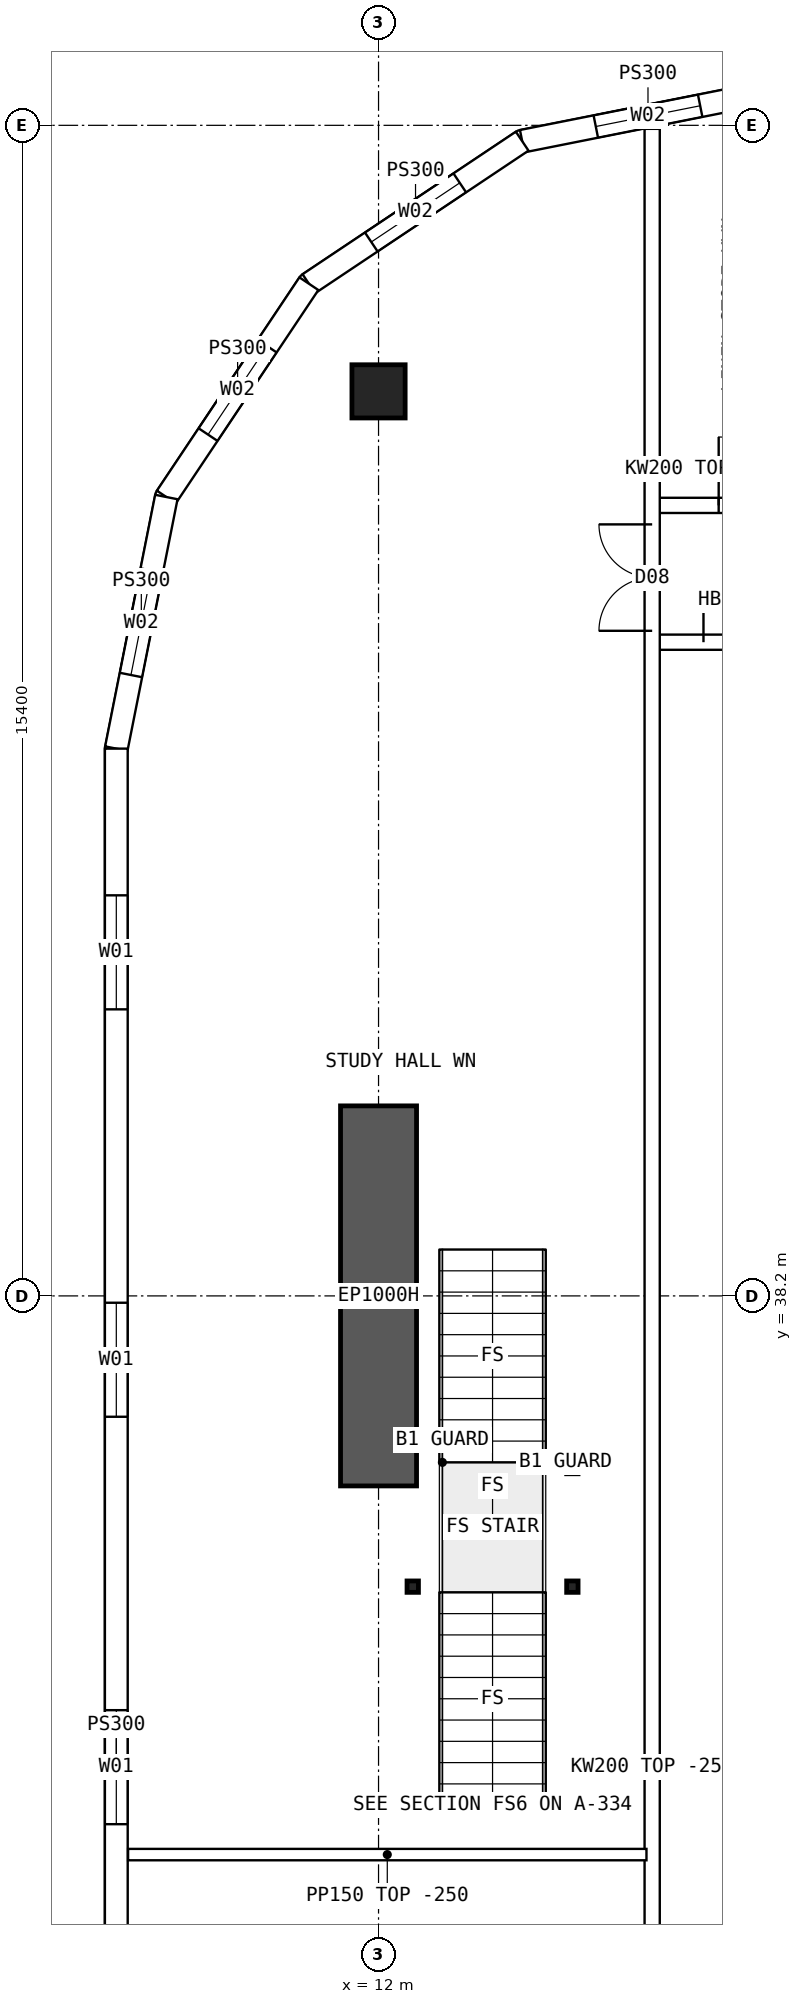
"""IFC4 building model, lengths in metres.
Left out: names, types, materials, properties, quantities, classifications, styles, units other than length and angle.
Written with IfcOpenShell. Run it as: python <this file> out.ifc"""

import sys

from ifc_helpers import new_model, si_unit, direction, frame, frame_2d, origin, origin_2d, place, context, subcontext, project, spatial, polyline, rectangle, hollow_rectangle, outline, extrude, element, fill, save


model = new_model("IFC4")
c1 = context("Model", 3, precision=1e-05, world=origin(), true_north=direction((0.0, 1.0)))
c2 = subcontext(c1, "Body", "Model", "MODEL_VIEW")
j1 = project(units=[si_unit("LENGTHUNIT", "METRE"), si_unit("PLANEANGLEUNIT", "RADIAN")], contexts=[c1])
p1 = place(None, origin())
s1 = spatial("IfcSite", under=j1, at=p1, CompositionType="ELEMENT")
p2 = place(p1, origin())
s2 = spatial("IfcBuilding", under=s1, at=p2, CompositionType="ELEMENT")
p3 = place(p2, frame((0.0, 0.0, 193.6)))
s3 = spatial("IfcBuildingStorey", under=s2, at=p3, CompositionType="ELEMENT", Elevation=193.6)
p4 = place(p3, frame((12.0, 50.1, 0.0), z_axis=(0.0, 0.0, 1.0), x_axis=(1.0, 0.0, 0.0)))
e1 = element("IfcColumn", 1, at=p4, inside=s3, PredefinedType="COLUMN", context=c2, shape_type="SweptSolid", body=[
    extrude(hollow_rectangle(XDim=0.7, YDim=0.7, WallThickness=0.07, at=origin_2d()), origin(), (0.0, 0.0, 1.0), 3.75),
])
p5 = place(p3, frame((12.0, 35.7, 0.0), z_axis=(0.0, 0.0, 1.0), x_axis=(0.0, 1.0, 0.0)))
e2 = element("IfcWall", 2, at=p5, inside=s3, PredefinedType="SHEAR", context=c2, shape_type="SweptSolid", body=[
    extrude(rectangle(XDim=5.0, YDim=1.0, at=frame_2d((2.5, 0.0))), origin(), (0.0, 0.0, 1.0), 3.75),
])
p6 = place(p3, frame((8.55, 45.4, 0.0), z_axis=(0.0, 0.0, 1.0), x_axis=(0.0, -1.0, 0.0)))
e3 = element("IfcWall", 3, at=p6, inside=s3, PredefinedType="SOLIDWALL", context=c2, shape_type="SweptSolid", body=[
    extrude(outline(polyline([(-0.015, -0.15), (26.815, -0.15), (26.785, 0.15), (0.015, 0.15), (-0.015, -0.15)])), origin(), (0.0, 0.0, 1.0), 3.5),
])
p7 = place(p6, frame((1.93, 0.0, 0.9)))
e4 = element("IfcOpeningElement", 4, at=p7, cuts=e3, PredefinedType="OPENING", context=c2, shape_type="SweptSolid", body=[
    extrude(rectangle(XDim=1.5, YDim=2.0, at=frame_2d((0.75, 1.0))), frame((0.0, 0.16, 0.0), z_axis=(0.0, -1.0, 0.0), x_axis=(1.0, 0.0, 0.0)), (0.0, 0.0, 1.0), 0.32),
])
p8 = place(p6, frame((7.29, 0.0, 0.9)))
e5 = element("IfcOpeningElement", 5, at=p8, cuts=e3, PredefinedType="OPENING", context=c2, shape_type="SweptSolid", body=[
    extrude(rectangle(XDim=1.5, YDim=2.0, at=frame_2d((0.75, 1.0))), frame((0.0, 0.16, 0.0), z_axis=(0.0, -1.0, 0.0), x_axis=(1.0, 0.0, 0.0)), (0.0, 0.0, 1.0), 0.32),
])
p9 = place(p6, frame((12.65, 0.0, 0.9)))
e6 = element("IfcOpeningElement", 6, at=p9, cuts=e3, PredefinedType="OPENING", context=c2, shape_type="SweptSolid", body=[
    extrude(rectangle(XDim=1.5, YDim=2.0, at=frame_2d((0.75, 1.0))), frame((0.0, 0.16, 0.0), z_axis=(0.0, -1.0, 0.0), x_axis=(1.0, 0.0, 0.0)), (0.0, 0.0, 1.0), 0.32),
])
p10 = place(p6, frame((18.01, 0.0, 0.9)))
e7 = element("IfcOpeningElement", 7, at=p10, cuts=e3, PredefinedType="OPENING", context=c2, shape_type="SweptSolid", body=[
    extrude(rectangle(XDim=1.5, YDim=2.0, at=frame_2d((0.75, 1.0))), frame((0.0, 0.16, 0.0), z_axis=(0.0, -1.0, 0.0), x_axis=(1.0, 0.0, 0.0)), (0.0, 0.0, 1.0), 0.32),
])
p11 = place(p6, frame((23.37, 0.0, 0.9)))
e8 = element("IfcOpeningElement", 8, at=p11, cuts=e3, PredefinedType="OPENING", context=c2, shape_type="SweptSolid", body=[
    extrude(rectangle(XDim=1.5, YDim=2.0, at=frame_2d((0.75, 1.0))), frame((0.0, 0.16, 0.0), z_axis=(0.0, -1.0, 0.0), x_axis=(1.0, 0.0, 0.0)), (0.0, 0.0, 1.0), 0.32),
])
p12 = place(p3, frame((17.2, 54.05, 0.0), z_axis=(0.0, 0.0, 1.0), x_axis=(-0.98078325777, -0.195100490205, 0.0)))
e9 = element("IfcWall", 9, at=p12, inside=s3, PredefinedType="SOLIDWALL", context=c2, shape_type="SweptSolid", body=[
    extrude(outline(polyline([(-0.03, -0.15), (3.405, -0.15), (3.345, 0.15), (0.03, 0.15), (-0.03, -0.15)])), origin(), (0.0, 0.0, 1.0), 3.5),
])
p13 = place(p12, frame((0.988, 0.0, 0.9)))
e10 = element("IfcOpeningElement", 10, at=p13, cuts=e9, PredefinedType="OPENING", context=c2, shape_type="SweptSolid", body=[
    extrude(rectangle(XDim=1.4, YDim=1.8, at=frame_2d((0.7, 0.9))), frame((0.0, 0.16, 0.0), z_axis=(0.0, -1.0, 0.0), x_axis=(1.0, 0.0, 0.0)), (0.0, 0.0, 1.0), 0.32),
])
p14 = place(p3, frame((13.89, 53.392, 0.0), z_axis=(0.0, 0.0, 1.0), x_axis=(-0.831493450887, -0.555534554399, 0.0)))
e11 = element("IfcWall", 11, at=p14, inside=s3, PredefinedType="SOLIDWALL", context=c2, shape_type="SweptSolid", body=[
    extrude(outline(polyline([(-0.03, -0.15), (3.405, -0.15), (3.345, 0.15), (0.03, 0.15), (-0.03, -0.15)])), origin(), (0.0, 0.0, 1.0), 3.5),
])
p15 = place(p14, frame((0.988, 0.0, 0.9)))
e12 = element("IfcOpeningElement", 12, at=p15, cuts=e11, PredefinedType="OPENING", context=c2, shape_type="SweptSolid", body=[
    extrude(rectangle(XDim=1.4, YDim=1.8, at=frame_2d((0.7, 0.9))), frame((0.0, 0.16, 0.0), z_axis=(0.0, -1.0, 0.0), x_axis=(1.0, 0.0, 0.0)), (0.0, 0.0, 1.0), 0.32),
])
p16 = place(p3, frame((11.083, 51.517, 0.0), z_axis=(0.0, 0.0, 1.0), x_axis=(-0.555534554399, -0.831493450887, 0.0)))
e13 = element("IfcWall", 13, at=p16, inside=s3, PredefinedType="SOLIDWALL", context=c2, shape_type="SweptSolid", body=[
    extrude(outline(polyline([(-0.03, -0.15), (3.405, -0.15), (3.345, 0.15), (0.03, 0.15), (-0.03, -0.15)])), origin(), (0.0, 0.0, 1.0), 3.5),
])
p17 = place(p16, frame((0.988, 0.0, 0.9)))
e14 = element("IfcOpeningElement", 14, at=p17, cuts=e13, PredefinedType="OPENING", context=c2, shape_type="SweptSolid", body=[
    extrude(rectangle(XDim=1.4, YDim=1.8, at=frame_2d((0.7, 0.9))), frame((0.0, 0.16, 0.0), z_axis=(0.0, -1.0, 0.0), x_axis=(1.0, 0.0, 0.0)), (0.0, 0.0, 1.0), 0.32),
])
p18 = place(p3, frame((9.208, 48.71, 0.0), z_axis=(0.0, 0.0, 1.0), x_axis=(-0.19508664885, -0.980786011034, 0.0)))
e15 = element("IfcWall", 15, at=p18, inside=s3, PredefinedType="SOLIDWALL", context=c2, shape_type="SweptSolid", body=[
    extrude(outline(polyline([(-0.03, -0.15), (3.39, -0.15), (3.36, 0.15), (0.03, 0.15), (-0.03, -0.15)])), origin(), (0.0, 0.0, 1.0), 3.5),
])
p19 = place(p18, frame((0.988, 0.0, 0.9)))
e16 = element("IfcOpeningElement", 16, at=p19, cuts=e15, PredefinedType="OPENING", context=c2, shape_type="SweptSolid", body=[
    extrude(rectangle(XDim=1.4, YDim=1.8, at=frame_2d((0.7, 0.9))), frame((0.0, 0.16, 0.0), z_axis=(0.0, -1.0, 0.0), x_axis=(1.0, 0.0, 0.0)), (0.0, 0.0, 1.0), 0.32),
])
p20 = place(p3, frame((15.6, 48.6, 0.0), z_axis=(0.0, 0.0, 1.0), x_axis=(1.0, 0.0, 0.0)))
e17 = element("IfcWall", 17, at=p20, inside=s3, PredefinedType="SOLIDWALL", context=c2, shape_type="SweptSolid", body=[
    extrude(rectangle(XDim=1.975, YDim=0.2, at=frame_2d((0.987, 0.0))), origin(), (0.0, 0.0, 1.0), 3.5),
])
p21 = place(p20, frame((0.875, 0.0, 0.0)))
e18 = element("IfcOpeningElement", 18, at=p21, cuts=e17, PredefinedType="OPENING", context=c2, shape_type="SweptSolid", body=[
    extrude(rectangle(XDim=0.9, YDim=2.1, at=frame_2d((0.45, 1.05))), frame((0.0, 0.11, 0.0), z_axis=(0.0, -1.0, 0.0), x_axis=(1.0, 0.0, 0.0)), (0.0, 0.0, 1.0), 0.22),
])
p22 = place(p3, frame((15.6, 46.8, 0.0), z_axis=(0.0, 0.0, 1.0), x_axis=(1.0, 0.0, 0.0)))
e19 = element("IfcWall", 19, at=p22, inside=s3, PredefinedType="SOLIDWALL", context=c2, shape_type="SweptSolid", body=[
    extrude(rectangle(XDim=1.975, YDim=0.2, at=frame_2d((0.987, 0.0))), origin(), (0.0, 0.0, 1.0), 3.5),
])
p23 = place(p22, frame((0.675, 0.0, 0.0)))
e20 = element("IfcOpeningElement", 20, at=p23, cuts=e19, PredefinedType="OPENING", context=c2, shape_type="SweptSolid", body=[
    extrude(rectangle(XDim=1.2, YDim=2.1, at=frame_2d((0.6, 1.05))), frame((0.0, 0.11, 0.0), z_axis=(0.0, -1.0, 0.0), x_axis=(1.0, 0.0, 0.0)), (0.0, 0.0, 1.0), 0.22),
])
p24 = place(p3, frame((8.705, 30.85, 0.0), z_axis=(0.0, 0.0, 1.0), x_axis=(1.0, 0.0, 0.0)))
e21 = element("IfcWall", 21, at=p24, inside=s3, PredefinedType="PARTITIONING", context=c2, shape_type="SweptSolid", body=[
    extrude(outline(polyline([(0.0, 0.0), (6.82, 0.0), (6.82, 3.5), (3.597, 3.5), (3.595, 3.05), (2.997, 3.05), (2.995, 3.5), (0.0, 3.5), (0.0, 0.0)])), frame((0.0, 0.075, 0.0), z_axis=(0.0, -1.0, 0.0), x_axis=(1.0, 0.0, 0.0)), (0.0, 0.0, 1.0), 0.15),
])
p25 = place(p3, frame((15.6, 10.446, 0.0), z_axis=(0.0, 0.0, 1.0), x_axis=(0.0, 1.0, 0.0)))
e22 = element("IfcWall", 22, at=p25, inside=s3, PredefinedType="SOLIDWALL", context=c2, shape_type="SweptSolid", body=[
    extrude(rectangle(XDim=43.107, YDim=0.2, at=frame_2d((21.554, 0.0))), origin(), (0.0, 0.0, 1.0), 3.5),
])
p26 = place(p25, frame((5.104, 0.0, 0.0)))
e23 = element("IfcOpeningElement", 23, at=p26, cuts=e22, PredefinedType="OPENING", context=c2, shape_type="SweptSolid", body=[
    extrude(rectangle(XDim=1.4, YDim=2.1, at=frame_2d((0.7, 1.05))), frame((0.0, 0.11, 0.0), z_axis=(0.0, -1.0, 0.0), x_axis=(1.0, 0.0, 0.0)), (0.0, 0.0, 1.0), 0.22),
])
p27 = place(p25, frame((36.504, 0.0, 0.0)))
e24 = element("IfcOpeningElement", 24, at=p27, cuts=e22, PredefinedType="OPENING", context=c2, shape_type="SweptSolid", body=[
    extrude(rectangle(XDim=1.4, YDim=2.1, at=frame_2d((0.7, 1.05))), frame((0.0, 0.11, 0.0), z_axis=(0.0, -1.0, 0.0), x_axis=(1.0, 0.0, 0.0)), (0.0, 0.0, 1.0), 0.22),
])
for number, where, z_axis, x_axis in (
    (25, (12.45, 34.375, 0.0), (0.0, 0.0, 1.0), (1.0, 0.0, 0.0)),
    (26, (14.55, 34.375, 0.0), (0.0, 0.0, 1.0), (1.0, 0.0, 0.0)),
    (27, (14.55, 35.935, 0.0), (0.0, 0.0, 1.0), (1.0, 0.0, 0.0)),
):
    element("IfcColumn", number, at=place(p3, frame(where, z_axis=z_axis, x_axis=x_axis)), inside=s3, PredefinedType="COLUMN", context=c2, shape_type="SweptSolid", body=[
        extrude(hollow_rectangle(XDim=0.15, YDim=0.15, WallThickness=0.008, at=origin_2d()), origin(), (0.0, 0.0, 1.0), 3.5),
    ])
p28 = place(p7, origin())
e28 = element("IfcWindow", 28, at=p28, inside=s3, PartitioningType="SINGLE_PANEL", PredefinedType="WINDOW", context=c2, shape_type="SweptSolid", body=[
    extrude(rectangle(XDim=1.5, YDim=2.0, at=frame_2d((0.75, 1.0))), frame((0.0, 0.03, 0.0), z_axis=(0.0, -1.0, 0.0), x_axis=(1.0, 0.0, 0.0)), (0.0, 0.0, 1.0), 0.06),
])
fill(e4, e28)
p29 = place(p8, origin())
e29 = element("IfcWindow", 29, at=p29, inside=s3, PartitioningType="SINGLE_PANEL", PredefinedType="WINDOW", context=c2, shape_type="SweptSolid", body=[
    extrude(rectangle(XDim=1.5, YDim=2.0, at=frame_2d((0.75, 1.0))), frame((0.0, 0.03, 0.0), z_axis=(0.0, -1.0, 0.0), x_axis=(1.0, 0.0, 0.0)), (0.0, 0.0, 1.0), 0.06),
])
fill(e5, e29)
p30 = place(p9, origin())
e30 = element("IfcWindow", 30, at=p30, inside=s3, PartitioningType="SINGLE_PANEL", PredefinedType="WINDOW", context=c2, shape_type="SweptSolid", body=[
    extrude(rectangle(XDim=1.5, YDim=2.0, at=frame_2d((0.75, 1.0))), frame((0.0, 0.03, 0.0), z_axis=(0.0, -1.0, 0.0), x_axis=(1.0, 0.0, 0.0)), (0.0, 0.0, 1.0), 0.06),
])
fill(e6, e30)
p31 = place(p13, origin())
e31 = element("IfcWindow", 31, at=p31, inside=s3, PartitioningType="SINGLE_PANEL", PredefinedType="WINDOW", context=c2, shape_type="SweptSolid", body=[
    extrude(rectangle(XDim=1.4, YDim=1.8, at=frame_2d((0.7, 0.9))), frame((0.0, 0.03, 0.0), z_axis=(0.0, -1.0, 0.0), x_axis=(1.0, 0.0, 0.0)), (0.0, 0.0, 1.0), 0.06),
])
fill(e10, e31)
p32 = place(p15, origin())
e32 = element("IfcWindow", 32, at=p32, inside=s3, PartitioningType="SINGLE_PANEL", PredefinedType="WINDOW", context=c2, shape_type="SweptSolid", body=[
    extrude(rectangle(XDim=1.4, YDim=1.8, at=frame_2d((0.7, 0.9))), frame((0.0, 0.03, 0.0), z_axis=(0.0, -1.0, 0.0), x_axis=(1.0, 0.0, 0.0)), (0.0, 0.0, 1.0), 0.06),
])
fill(e12, e32)
p33 = place(p17, origin())
e33 = element("IfcWindow", 33, at=p33, inside=s3, PartitioningType="SINGLE_PANEL", PredefinedType="WINDOW", context=c2, shape_type="SweptSolid", body=[
    extrude(rectangle(XDim=1.4, YDim=1.8, at=frame_2d((0.7, 0.9))), frame((0.0, 0.03, 0.0), z_axis=(0.0, -1.0, 0.0), x_axis=(1.0, 0.0, 0.0)), (0.0, 0.0, 1.0), 0.06),
])
fill(e14, e33)
p34 = place(p19, origin())
e34 = element("IfcWindow", 34, at=p34, inside=s3, PartitioningType="SINGLE_PANEL", PredefinedType="WINDOW", context=c2, shape_type="SweptSolid", body=[
    extrude(rectangle(XDim=1.4, YDim=1.8, at=frame_2d((0.7, 0.9))), frame((0.0, 0.03, 0.0), z_axis=(0.0, -1.0, 0.0), x_axis=(1.0, 0.0, 0.0)), (0.0, 0.0, 1.0), 0.06),
])
fill(e16, e34)
p35 = place(p23, origin())
e35 = element("IfcDoor", 35, at=p35, inside=s3, OperationType="DOUBLE_DOOR_SINGLE_SWING", PredefinedType="DOOR", context=c2, shape_type="SweptSolid", body=[
    extrude(rectangle(XDim=1.2, YDim=2.1, at=frame_2d((0.6, 1.05))), frame((0.0, 0.025, 0.0), z_axis=(0.0, -1.0, 0.0), x_axis=(1.0, 0.0, 0.0)), (0.0, 0.0, 1.0), 0.05),
])
fill(e20, e35)
p36 = place(p27, origin())
e36 = element("IfcDoor", 36, at=p36, inside=s3, OperationType="DOUBLE_DOOR_SINGLE_SWING", PredefinedType="DOOR", context=c2, shape_type="SweptSolid", body=[
    extrude(rectangle(XDim=1.4, YDim=2.1, at=frame_2d((0.7, 1.05))), frame((0.0, 0.025, 0.0), z_axis=(0.0, -1.0, 0.0), x_axis=(1.0, 0.0, 0.0)), (0.0, 0.0, 1.0), 0.05),
])
fill(e24, e36)
p37 = place(p21, origin())
e37 = element("IfcDoor", 37, at=p37, inside=s3, OperationType="SINGLE_SWING_LEFT", PredefinedType="DOOR", context=c2, shape_type="SweptSolid", body=[
    extrude(rectangle(XDim=0.9, YDim=2.1, at=frame_2d((0.45, 1.05))), frame((0.0, 0.025, 0.0), z_axis=(0.0, -1.0, 0.0), x_axis=(1.0, 0.0, 0.0)), (0.0, 0.0, 1.0), 0.05),
])
fill(e18, e37)
save(model, sys.argv[1])
